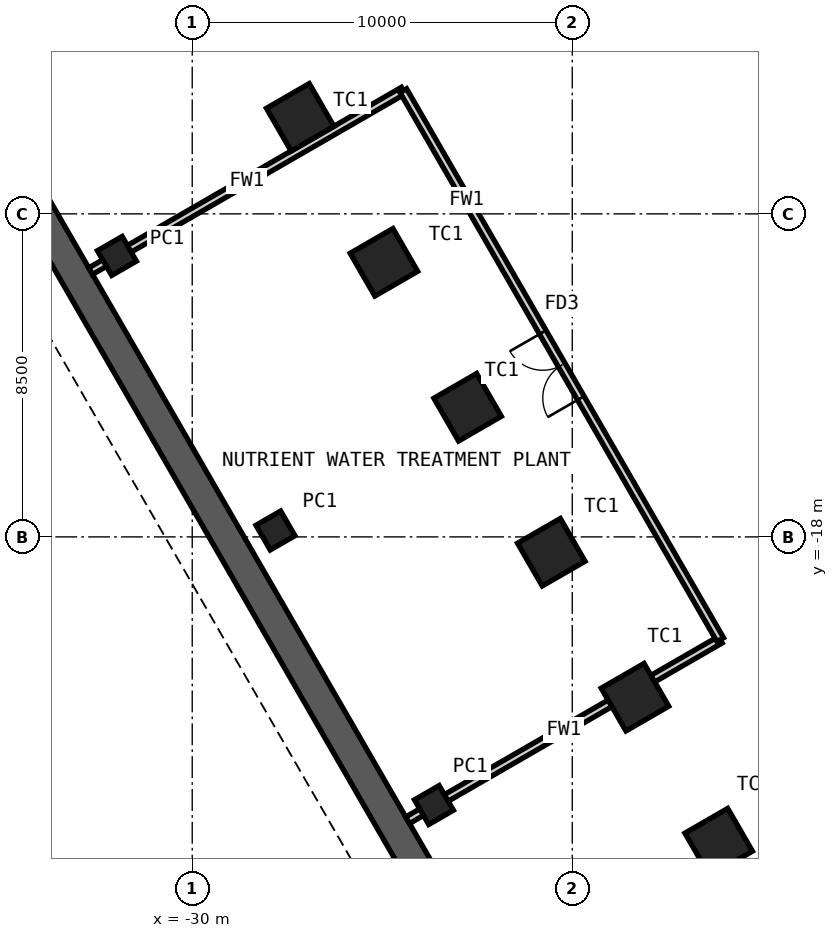
"""IFC4 building model, lengths in metres.
Left out: names, types, materials, properties, quantities, classifications, styles, units other than length and angle.
Written with IfcOpenShell. Run it as: python <this file> out.ifc"""

import sys

from ifc_helpers import new_model, si_unit, direction, frame, frame_2d, origin, origin_2d, place, context, subcontext, project, spatial, rectangle, hollow_rectangle, extrude, element, fill, save


model = new_model("IFC4")
c1 = context("Model", 3, precision=1e-05, world=origin(), true_north=direction((0.0, 1.0)))
c2 = subcontext(c1, "Body", "Model", "MODEL_VIEW")
j1 = project(units=[si_unit("LENGTHUNIT", "METRE"), si_unit("PLANEANGLEUNIT", "RADIAN")], contexts=[c1])
p1 = place(None, origin())
s1 = spatial("IfcSite", under=j1, at=p1, CompositionType="ELEMENT")
p2 = place(p1, origin())
s2 = spatial("IfcBuilding", under=s1, at=p2, CompositionType="ELEMENT")
p3 = place(p2, frame((0.0, 0.0, -12.0)))
s3 = spatial("IfcBuildingStorey", under=s2, at=p3, CompositionType="ELEMENT", Elevation=-12.0)
p4 = place(p3, frame((-20.133, -33.529, -0.2), z_axis=(0.0, 0.0, 1.0), x_axis=(-0.499996691743, 0.866027313799, 0.0)))
e1 = element("IfcWall", 1, at=p4, inside=s3, PredefinedType="SHEAR", context=c2, shape_type="SweptSolid", body=[
    extrude(rectangle(XDim=34.755, YDim=0.8, at=frame_2d((17.377, 0.0))), origin(), (0.0, 0.0, 1.0), 6.2),
])
for number, where, z_axis, x_axis in (
    (2, (-16.147, -26.033, -0.2), (0.0, 0.0, 1.0), (0.5, -0.866, 0.0)),
    (3, (-18.349, -22.218, -0.2), (0.0, 0.0, 1.0), (0.5, -0.866, 0.0)),
    (4, (-20.552, -18.404, -0.2), (0.0, 0.0, 1.0), (0.5, -0.866, 0.0)),
    (5, (-22.754, -14.589, -0.2), (0.0, 0.0, 1.0), (0.5, -0.866, 0.0)),
    (6, (-24.956, -10.775, -0.2), (0.0, 0.0, 1.0), (0.5, -0.866, 0.0)),
    (7, (-27.158, -6.96, -0.2), (0.0, 0.0, 1.0), (0.5, -0.866, 0.0)),
):
    element("IfcColumn", number, at=place(p3, frame(where, z_axis=z_axis, x_axis=x_axis)), inside=s3, PredefinedType="COLUMN", context=c2, shape_type="SweptSolid", body=[
        extrude(hollow_rectangle(XDim=1.3, YDim=1.3, WallThickness=0.1, at=origin_2d()), origin(), (0.0, 0.0, 1.0), 6.2),
    ])
for number, where, z_axis, x_axis in (
    (8, (-23.639, -25.055, -0.2), (0.0, 0.0, 1.0), (0.5, -0.866, 0.0)),
    (9, (-27.81, -17.831, -0.2), (0.0, 0.0, 1.0), (0.5, -0.866, 0.0)),
    (10, (-31.981, -10.607, -0.2), (0.0, 0.0, 1.0), (0.5, -0.866, 0.0)),
):
    element("IfcColumn", number, at=place(p3, frame(where, z_axis=z_axis, x_axis=x_axis)), inside=s3, PredefinedType="COLUMN", context=c2, shape_type="SweptSolid", body=[
        extrude(hollow_rectangle(XDim=0.75, YDim=0.75, WallThickness=0.036, at=origin_2d()), origin(), (0.0, 0.0, 1.0), 6.2),
    ])
for number, where, z_axis, x_axis in (
    (11, (-24.332, -25.455, 0.0), (0.0, 0.0, 1.0), (0.866, 0.5, 0.0)),
    (12, (-32.674, -11.007, 0.0), (0.0, 0.0, 1.0), (0.866, 0.5, 0.0)),
):
    element("IfcWall", number, at=place(p3, frame(where, z_axis=z_axis, x_axis=x_axis)), inside=s3, PredefinedType="PARTITIONING", context=c2, shape_type="SweptSolid", body=[
        extrude(rectangle(XDim=9.5, YDim=0.2, at=frame_2d((4.75, 0.0))), origin(), (0.0, 0.0, 1.0), 5.75),
    ])
p5 = place(p3, frame((-16.105, -20.705, 0.0), z_axis=(0.0, 0.0, 1.0), x_axis=(-0.500004511595, 0.866022798998, 0.0)))
e13 = element("IfcWall", 13, at=p5, inside=s3, PredefinedType="PARTITIONING", context=c2, shape_type="SweptSolid", body=[
    extrude(rectangle(XDim=16.683, YDim=0.2, at=frame_2d((8.342, 0.0))), origin(), (0.0, 0.0, 1.0), 5.75),
])
p6 = place(p5, frame((7.342, 0.0, 0.0)))
e14 = element("IfcOpeningElement", 14, at=p6, cuts=e13, PredefinedType="OPENING", context=c2, shape_type="SweptSolid", body=[
    extrude(rectangle(XDim=2.0, YDim=2.4, at=frame_2d((1.0, 1.2))), frame((0.0, 0.11, 0.0), z_axis=(0.0, -1.0, 0.0), x_axis=(1.0, 0.0, 0.0)), (0.0, 0.0, 1.0), 0.22),
])
p7 = place(p6, origin())
e15 = element("IfcDoor", 15, at=p7, inside=s3, OperationType="DOUBLE_DOOR_DOUBLE_SWING", PredefinedType="DOOR", context=c2, shape_type="SweptSolid", body=[
    extrude(rectangle(XDim=2.0, YDim=2.4, at=frame_2d((1.0, 1.2))), frame((0.0, 0.025, 0.0), z_axis=(0.0, -1.0, 0.0), x_axis=(1.0, 0.0, 0.0)), (0.0, 0.0, 1.0), 0.05),
])
fill(e14, e15)
save(model, sys.argv[1])
